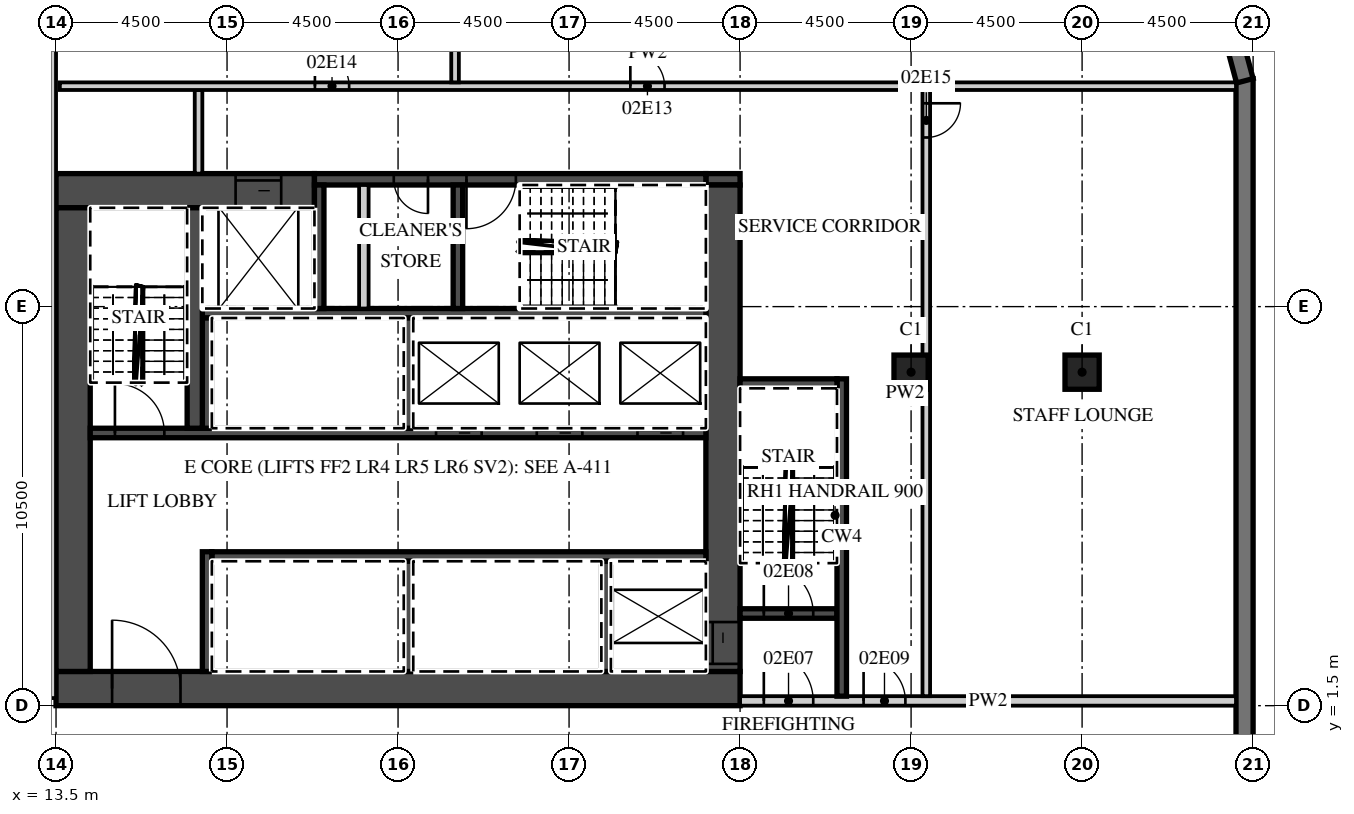
"""IFC4 building model, lengths in metres.
Left out: names, types, materials, properties, quantities, classifications, styles, units other than length and angle.
Written with IfcOpenShell. Run it as: python <this file> out.ifc"""

import sys

from ifc_helpers import new_model, si_unit, direction, frame, frame_2d, origin, origin_2d, place, context, subcontext, project, spatial, polyline, rectangle, outline, extrude, element, fill, save


model = new_model("IFC4")
c1 = context("Model", 3, precision=1e-05, world=origin(), true_north=direction((0.0, 1.0)))
c2 = subcontext(c1, "Body", "Model", "MODEL_VIEW")
j1 = project(units=[si_unit("LENGTHUNIT", "METRE"), si_unit("PLANEANGLEUNIT", "RADIAN")], contexts=[c1])
p1 = place(None, origin())
s1 = spatial("IfcSite", under=j1, at=p1, CompositionType="ELEMENT")
p2 = place(p1, origin())
s2 = spatial("IfcBuilding", under=s1, at=p2, CompositionType="ELEMENT")
p3 = place(p2, frame((0.0, 0.0, 17.0)))
s3 = spatial("IfcBuildingStorey", under=s2, at=p3, CompositionType="ELEMENT", Elevation=17.0)
for number, where, z_axis, x_axis in (
    (1, (36.0, 10.275, 0.0), (0.0, 0.0, 1.0), (1.0, 0.0, 0.0)),
    (2, (40.5, 10.275, 0.0), (0.0, 0.0, 1.0), (1.0, 0.0, 0.0)),
):
    element("IfcColumn", number, at=place(p3, frame(where, z_axis=z_axis, x_axis=x_axis)), inside=s3, PredefinedType="COLUMN", context=c2, shape_type="SweptSolid", body=[
        extrude(rectangle(XDim=0.9, YDim=0.9, at=origin_2d()), origin(), (0.0, 0.0, 1.0), 6.5),
    ])
p4 = place(p3, frame((44.775, -18.0, 0.0), z_axis=(0.0, 0.0, 1.0), x_axis=(0.0, 1.0, 0.0)))
e3 = element("IfcWall", 3, at=p4, inside=s3, PredefinedType="SOLIDWALL", context=c2, shape_type="SweptSolid", body=[
    extrude(rectangle(XDim=36.0, YDim=0.45, at=frame_2d((18.0, 0.0))), origin(), (0.0, 0.0, 1.0), 6.05),
])
p5 = place(p4, frame((4.05, 0.0, 0.9)))
e4 = element("IfcOpeningElement", 4, at=p5, cuts=e3, PredefinedType="OPENING", context=c2, shape_type="SweptSolid", body=[
    extrude(rectangle(XDim=3.0, YDim=1.8, at=frame_2d((1.5, 0.9))), frame((0.0, 0.235, 0.0), z_axis=(0.0, -1.0, 0.0), x_axis=(1.0, 0.0, 0.0)), (0.0, 0.0, 1.0), 0.47),
])
p6 = place(p3, frame((44.783, 17.942, 0.0), z_axis=(0.0, 0.0, 1.0), x_axis=(-0.25881466832, 0.965926999034, 0.0)))
e5 = element("IfcWall", 5, at=p6, inside=s3, PredefinedType="SOLIDWALL", context=c2, shape_type="SweptSolid", body=[
    extrude(outline(polyline([(0.0, -0.225), (2.071, -0.225), (1.95, 0.225), (0.121, 0.225), (0.0, -0.225)])), origin(), (0.0, 0.0, 1.0), 6.05),
])
p7 = place(p3, frame((13.5, 1.95, 0.0), z_axis=(0.0, 0.0, 1.0), x_axis=(1.0, 0.0, 0.0)))
e6 = element("IfcWall", 6, at=p7, inside=s3, PredefinedType="SHEAR", context=c2, shape_type="SweptSolid", body=[
    extrude(rectangle(XDim=18.0, YDim=0.9, at=frame_2d((9.0, 0.0))), origin(), (0.0, 0.0, 1.0), 6.05),
])
p8 = place(p7, frame((1.475, 0.0, 0.0)))
e7 = element("IfcOpeningElement", 7, at=p8, cuts=e6, PredefinedType="OPENING", context=c2, shape_type="SweptSolid", body=[
    extrude(rectangle(XDim=1.8, YDim=2.1, at=frame_2d((0.9, 1.05))), frame((0.0, 0.46, 0.0), z_axis=(0.0, -1.0, 0.0), x_axis=(1.0, 0.0, 0.0)), (0.0, 0.0, 1.0), 0.92),
])
p9 = place(p3, frame((13.5, 15.05, 0.0), z_axis=(0.0, 0.0, 1.0), x_axis=(1.0, 0.0, 0.0)))
e8 = element("IfcWall", 8, at=p9, inside=s3, PredefinedType="SHEAR", context=c2, shape_type="SweptSolid", body=[
    extrude(rectangle(XDim=6.8, YDim=0.9, at=frame_2d((3.4, 0.0))), origin(), (0.0, 0.0, 1.0), 6.05),
])
p10 = place(p9, frame((4.725, 0.0, 0.0)))
e9 = element("IfcOpeningElement", 9, at=p10, cuts=e8, PredefinedType="OPENING", context=c2, shape_type="SweptSolid", body=[
    extrude(rectangle(XDim=1.2, YDim=2.1, at=frame_2d((0.6, 1.05))), frame((0.0, 0.46, 0.0), z_axis=(0.0, -1.0, 0.0), x_axis=(1.0, 0.0, 0.0)), (0.0, 0.0, 1.0), 0.92),
])
p11 = place(p3, frame((30.6, 15.35, 0.0), z_axis=(0.0, 0.0, 1.0), x_axis=(1.0, 0.0, 0.0)))
e10 = element("IfcWall", 10, at=p11, inside=s3, PredefinedType="SHEAR", context=c2, shape_type="SweptSolid", body=[
    extrude(rectangle(XDim=0.9, YDim=0.3, at=frame_2d((0.45, 0.0))), origin(), (0.0, 0.0, 1.0), 6.05),
])
p12 = place(p3, frame((20.3, 15.35, 0.0), z_axis=(0.0, 0.0, 1.0), x_axis=(1.0, 0.0, 0.0)))
e11 = element("IfcWall", 11, at=p12, inside=s3, PredefinedType="SHEAR", context=c2, shape_type="SweptSolid", body=[
    extrude(rectangle(XDim=10.3, YDim=0.3, at=frame_2d((5.15, 0.0))), origin(), (0.0, 0.0, 1.0), 6.05),
])
p13 = place(p12, frame((4.0, 0.0, 0.0)))
e12 = element("IfcOpeningElement", 12, at=p13, cuts=e11, PredefinedType="OPENING", context=c2, shape_type="SweptSolid", body=[
    extrude(rectangle(XDim=1.3, YDim=2.1, at=frame_2d((0.65, 1.05))), frame((0.0, 0.16, 0.0), z_axis=(0.0, -1.0, 0.0), x_axis=(1.0, 0.0, 0.0)), (0.0, 0.0, 1.0), 0.32),
])
p14 = place(p12, frame((2.087, 0.0, 0.0)))
e13 = element("IfcOpeningElement", 13, at=p14, cuts=e11, PredefinedType="OPENING", context=c2, shape_type="SweptSolid", body=[
    extrude(rectangle(XDim=0.9, YDim=2.1, at=frame_2d((0.45, 1.05))), frame((0.0, 0.16, 0.0), z_axis=(0.0, -1.0, 0.0), x_axis=(1.0, 0.0, 0.0)), (0.0, 0.0, 1.0), 0.32),
])
p15 = place(p3, frame((31.05, 2.4, 0.0), z_axis=(0.0, 0.0, 1.0), x_axis=(0.0, 1.0, 0.0)))
e14 = element("IfcWall", 14, at=p15, inside=s3, PredefinedType="SHEAR", context=c2, shape_type="SweptSolid", body=[
    extrude(rectangle(XDim=12.8, YDim=0.9, at=frame_2d((6.4, 0.0))), origin(), (0.0, 0.0, 1.0), 6.05),
])
p16 = place(p15, frame((0.2, 0.0, 0.0)))
e15 = element("IfcOpeningElement", 15, at=p16, cuts=e14, PredefinedType="OPENING", context=c2, shape_type="SweptSolid", body=[
    extrude(rectangle(XDim=1.1, YDim=2.1, at=frame_2d((0.55, 1.05))), frame((0.0, 0.46, 0.0), z_axis=(0.0, -1.0, 0.0), x_axis=(1.0, 0.0, 0.0)), (0.0, 0.0, 1.0), 0.92),
])
p17 = place(p3, frame((13.95, 2.4, 0.0), z_axis=(0.0, 0.0, 1.0), x_axis=(0.0, 1.0, 0.0)))
e16 = element("IfcWall", 16, at=p17, inside=s3, PredefinedType="SHEAR", context=c2, shape_type="SweptSolid", body=[
    extrude(rectangle(XDim=12.2, YDim=0.9, at=frame_2d((6.1, 0.0))), origin(), (0.0, 0.0, 1.0), 6.05),
])
p18 = place(p3, frame((17.6, 5.425, 0.0), z_axis=(0.0, 0.0, 1.0), x_axis=(1.0, 0.0, 0.0)))
e17 = element("IfcWall", 17, at=p18, inside=s3, PredefinedType="SHEAR", context=c2, shape_type="SweptSolid", body=[
    extrude(rectangle(XDim=13.0, YDim=0.25, at=frame_2d((6.5, 0.0))), origin(), (0.0, 0.0, 1.0), 6.05),
])
p19 = place(p3, frame((17.475, 2.4, 0.0), z_axis=(0.0, 0.0, 1.0), x_axis=(0.0, 1.0, 0.0)))
e18 = element("IfcWall", 18, at=p19, inside=s3, PredefinedType="SHEAR", context=c2, shape_type="SweptSolid", body=[
    extrude(rectangle(XDim=3.15, YDim=0.25, at=frame_2d((1.575, 0.0))), origin(), (0.0, 0.0, 1.0), 6.05),
])
for number, where, z_axis, x_axis in (
    (19, (27.975, 2.4, 0.0), (0.0, 0.0, 1.0), (0.0, 1.0, 0.0)),
    (20, (22.775, 2.4, 0.0), (0.0, 0.0, 1.0), (0.0, 1.0, 0.0)),
):
    element("IfcWall", number, at=place(p3, frame(where, z_axis=z_axis, x_axis=x_axis)), inside=s3, PredefinedType="SHEAR", context=c2, shape_type="SweptSolid", body=[
        extrude(rectangle(XDim=2.9, YDim=0.25, at=frame_2d((1.45, 0.0))), origin(), (0.0, 0.0, 1.0), 6.05),
    ])
p20 = place(p3, frame((14.4, 8.675, 0.0), z_axis=(0.0, 0.0, 1.0), x_axis=(1.0, 0.0, 0.0)))
e21 = element("IfcWall", 21, at=p20, inside=s3, PredefinedType="SHEAR", context=c2, shape_type="SweptSolid", body=[
    extrude(rectangle(XDim=16.2, YDim=0.25, at=frame_2d((8.1, 0.0))), origin(), (0.0, 0.0, 1.0), 6.05),
])
p21 = place(p20, frame((14.4, 0.0, 0.0)))
e22 = element("IfcOpeningElement", 22, at=p21, cuts=e21, PredefinedType="OPENING", context=c2, shape_type="SweptSolid", body=[
    extrude(rectangle(XDim=1.2, YDim=2.1, at=frame_2d((0.6, 1.05))), frame((0.0, 0.135, 0.0), z_axis=(0.0, -1.0, 0.0), x_axis=(1.0, 0.0, 0.0)), (0.0, 0.0, 1.0), 0.27),
])
p22 = place(p20, frame((11.75, 0.0, 0.0)))
e23 = element("IfcOpeningElement", 23, at=p22, cuts=e21, PredefinedType="OPENING", context=c2, shape_type="SweptSolid", body=[
    extrude(rectangle(XDim=1.2, YDim=2.1, at=frame_2d((0.6, 1.05))), frame((0.0, 0.135, 0.0), z_axis=(0.0, -1.0, 0.0), x_axis=(1.0, 0.0, 0.0)), (0.0, 0.0, 1.0), 0.27),
])
p23 = place(p20, frame((9.1, 0.0, 0.0)))
e24 = element("IfcOpeningElement", 24, at=p23, cuts=e21, PredefinedType="OPENING", context=c2, shape_type="SweptSolid", body=[
    extrude(rectangle(XDim=1.2, YDim=2.1, at=frame_2d((0.6, 1.05))), frame((0.0, 0.135, 0.0), z_axis=(0.0, -1.0, 0.0), x_axis=(1.0, 0.0, 0.0)), (0.0, 0.0, 1.0), 0.27),
])
p24 = place(p20, frame((0.65, 0.0, 0.0)))
e25 = element("IfcOpeningElement", 25, at=p24, cuts=e21, PredefinedType="OPENING", context=c2, shape_type="SweptSolid", body=[
    extrude(rectangle(XDim=1.3, YDim=2.1, at=frame_2d((0.65, 1.05))), frame((0.0, 0.135, 0.0), z_axis=(0.0, -1.0, 0.0), x_axis=(1.0, 0.0, 0.0)), (0.0, 0.0, 1.0), 0.27),
])
p25 = place(p3, frame((17.35, 11.825, 0.0), z_axis=(0.0, 0.0, 1.0), x_axis=(1.0, 0.0, 0.0)))
e26 = element("IfcWall", 26, at=p25, inside=s3, PredefinedType="SHEAR", context=c2, shape_type="SweptSolid", body=[
    extrude(rectangle(XDim=13.25, YDim=0.25, at=frame_2d((6.625, 0.0))), origin(), (0.0, 0.0, 1.0), 6.05),
])
for number, where, z_axis, x_axis in (
    (27, (17.475, 8.8, 0.0), (0.0, 0.0, 1.0), (0.0, 1.0, 0.0)),
    (28, (22.775, 8.8, 0.0), (0.0, 0.0, 1.0), (0.0, 1.0, 0.0)),
):
    element("IfcWall", number, at=place(p3, frame(where, z_axis=z_axis, x_axis=x_axis)), inside=s3, PredefinedType="SHEAR", context=c2, shape_type="SweptSolid", body=[
        extrude(rectangle(XDim=2.9, YDim=0.25, at=frame_2d((1.45, 0.0))), origin(), (0.0, 0.0, 1.0), 6.05),
    ])
p26 = place(p3, frame((17.15, 8.8, 0.0), z_axis=(0.0, 0.0, 1.0), x_axis=(0.0, 1.0, 0.0)))
e29 = element("IfcWall", 29, at=p26, inside=s3, PredefinedType="SHEAR", context=c2, shape_type="SweptSolid", body=[
    extrude(rectangle(XDim=5.8, YDim=0.4, at=frame_2d((2.9, 0.0))), origin(), (0.0, 0.0, 1.0), 6.05),
])
for number, where, z_axis, x_axis in (
    (30, (20.425, 11.95, 0.0), (0.0, 0.0, 1.0), (0.0, 1.0, 0.0)),
    (31, (24.075, 11.95, 0.0), (0.0, 0.0, 1.0), (0.0, 1.0, 0.0)),
):
    element("IfcWall", number, at=place(p3, frame(where, z_axis=z_axis, x_axis=x_axis)), inside=s3, PredefinedType="SHEAR", context=c2, shape_type="SweptSolid", body=[
        extrude(rectangle(XDim=3.25, YDim=0.25, at=frame_2d((1.625, 0.0))), origin(), (0.0, 0.0, 1.0), 6.05),
    ])
p27 = place(p3, frame((21.6, 11.95, 0.0), z_axis=(0.0, 0.0, 1.0), x_axis=(0.0, 1.0, 0.0)))
e32 = element("IfcWall", 32, at=p27, inside=s3, PredefinedType="PARTITIONING", context=c2, shape_type="SweptSolid", body=[
    extrude(rectangle(XDim=3.25, YDim=0.25, at=frame_2d((1.625, 0.0))), origin(), (0.0, 0.0, 1.0), 6.05),
])
p28 = place(p3, frame((31.5, 1.625, 0.0), z_axis=(0.0, 0.0, 1.0), x_axis=(1.0, 0.0, 0.0)))
e33 = element("IfcWall", 33, at=p28, inside=s3, PredefinedType="PARTITIONING", context=c2, shape_type="SweptSolid", body=[
    extrude(rectangle(XDim=13.05, YDim=0.25, at=frame_2d((6.525, 0.0))), origin(), (0.0, 0.0, 1.0), 6.05),
])
p29 = place(p28, frame((0.625, 0.0, 0.0)))
e34 = element("IfcOpeningElement", 34, at=p29, cuts=e33, PredefinedType="OPENING", context=c2, shape_type="SweptSolid", body=[
    extrude(rectangle(XDim=1.3, YDim=2.1, at=frame_2d((0.65, 1.05))), frame((0.0, 0.135, 0.0), z_axis=(0.0, -1.0, 0.0), x_axis=(1.0, 0.0, 0.0)), (0.0, 0.0, 1.0), 0.27),
])
p30 = place(p28, frame((3.25, 0.0, 0.0)))
e35 = element("IfcOpeningElement", 35, at=p30, cuts=e33, PredefinedType="OPENING", context=c2, shape_type="SweptSolid", body=[
    extrude(rectangle(XDim=1.1, YDim=2.1, at=frame_2d((0.55, 1.05))), frame((0.0, 0.135, 0.0), z_axis=(0.0, -1.0, 0.0), x_axis=(1.0, 0.0, 0.0)), (0.0, 0.0, 1.0), 0.27),
])
p31 = place(p3, frame((31.5, 3.925, 0.0), z_axis=(0.0, 0.0, 1.0), x_axis=(1.0, 0.0, 0.0)))
e36 = element("IfcWall", 36, at=p31, inside=s3, PredefinedType="SHEAR", context=c2, shape_type="SweptSolid", body=[
    extrude(rectangle(XDim=2.55, YDim=0.25, at=frame_2d((1.275, 0.0))), origin(), (0.0, 0.0, 1.0), 6.05),
])
p32 = place(p31, frame((0.625, 0.0, 0.0)))
e37 = element("IfcOpeningElement", 37, at=p32, cuts=e36, PredefinedType="OPENING", context=c2, shape_type="SweptSolid", body=[
    extrude(rectangle(XDim=1.3, YDim=2.1, at=frame_2d((0.65, 1.05))), frame((0.0, 0.135, 0.0), z_axis=(0.0, -1.0, 0.0), x_axis=(1.0, 0.0, 0.0)), (0.0, 0.0, 1.0), 0.27),
])
p33 = place(p3, frame((34.175, 1.75, 0.0), z_axis=(0.0, 0.0, 1.0), x_axis=(0.0, 1.0, 0.0)))
e38 = element("IfcWall", 38, at=p33, inside=s3, PredefinedType="SHEAR", context=c2, shape_type="SweptSolid", body=[
    extrude(rectangle(XDim=8.35, YDim=0.25, at=frame_2d((4.175, 0.0))), origin(), (0.0, 0.0, 1.0), 6.05),
])
p34 = place(p3, frame((31.5, 9.975, 0.0), z_axis=(0.0, 0.0, 1.0), x_axis=(1.0, 0.0, 0.0)))
e39 = element("IfcWall", 39, at=p34, inside=s3, PredefinedType="SHEAR", context=c2, shape_type="SweptSolid", body=[
    extrude(rectangle(XDim=2.55, YDim=0.25, at=frame_2d((1.275, 0.0))), origin(), (0.0, 0.0, 1.0), 6.05),
])
p35 = place(p3, frame((17.25, 15.5, 0.0), z_axis=(0.0, 0.0, 1.0), x_axis=(0.0, 1.0, 0.0)))
e40 = element("IfcWall", 40, at=p35, inside=s3, PredefinedType="PARTITIONING", context=c2, shape_type="SweptSolid", body=[
    extrude(rectangle(XDim=2.2, YDim=0.2, at=frame_2d((1.1, 0.0))), origin(), (0.0, 0.0, 1.0), 6.05),
])
p36 = place(p3, frame((36.4, 1.75, 0.0), z_axis=(0.0, 0.0, 1.0), x_axis=(0.0, 1.0, 0.0)))
e41 = element("IfcWall", 41, at=p36, inside=s3, PredefinedType="PARTITIONING", context=c2, shape_type="SweptSolid", body=[
    extrude(rectangle(XDim=15.95, YDim=0.2, at=frame_2d((7.975, 0.0))), origin(), (0.0, 0.0, 1.0), 6.05),
])
p37 = place(p36, frame((14.7, 0.0, 0.0)))
e42 = element("IfcOpeningElement", 42, at=p37, cuts=e41, PredefinedType="OPENING", context=c2, shape_type="SweptSolid", body=[
    extrude(rectangle(XDim=0.9, YDim=2.1, at=frame_2d((0.45, 1.05))), frame((0.0, 0.11, 0.0), z_axis=(0.0, -1.0, 0.0), x_axis=(1.0, 0.0, 0.0)), (0.0, 0.0, 1.0), 0.22),
])
p38 = place(p3, frame((13.6, 17.8, 0.0), z_axis=(0.0, 0.0, 1.0), x_axis=(1.0, 0.0, 0.0)))
e43 = element("IfcWall", 43, at=p38, inside=s3, PredefinedType="PARTITIONING", context=c2, shape_type="SweptSolid", body=[
    extrude(rectangle(XDim=30.95, YDim=0.2, at=frame_2d((15.475, 0.0))), origin(), (0.0, 0.0, 1.0), 6.05),
])
p39 = place(p38, frame((15.012, 0.0, 0.0)))
e44 = element("IfcOpeningElement", 44, at=p39, cuts=e43, PredefinedType="OPENING", context=c2, shape_type="SweptSolid", body=[
    extrude(rectangle(XDim=0.9, YDim=2.1, at=frame_2d((0.45, 1.05))), frame((0.0, 0.11, 0.0), z_axis=(0.0, -1.0, 0.0), x_axis=(1.0, 0.0, 0.0)), (0.0, 0.0, 1.0), 0.22),
])
p40 = place(p38, frame((6.712, 0.0, 0.0)))
e45 = element("IfcOpeningElement", 45, at=p40, cuts=e43, PredefinedType="OPENING", context=c2, shape_type="SweptSolid", body=[
    extrude(rectangle(XDim=0.9, YDim=2.1, at=frame_2d((0.45, 1.05))), frame((0.0, 0.11, 0.0), z_axis=(0.0, -1.0, 0.0), x_axis=(1.0, 0.0, 0.0)), (0.0, 0.0, 1.0), 0.22),
])
p41 = place(p3, frame((24.0, 17.9, 0.0), z_axis=(0.0, 0.0, 1.0), x_axis=(0.0, 1.0, 0.0)))
e46 = element("IfcWall", 46, at=p41, inside=s3, PredefinedType="PARTITIONING", context=c2, shape_type="SweptSolid", body=[
    extrude(rectangle(XDim=3.65, YDim=0.2, at=frame_2d((1.825, 0.0))), origin(), (0.0, 0.0, 1.0), 6.05),
])
p42 = place(p3, frame((13.4, 1.7, 0.0), z_axis=(0.0, 0.0, 1.0), x_axis=(0.0, 1.0, 0.0)))
e47 = element("IfcWall", 47, at=p42, inside=s3, PredefinedType="PARTITIONING", context=c2, shape_type="SweptSolid", body=[
    extrude(rectangle(XDim=20.15, YDim=0.2, at=frame_2d((10.075, 0.0))), origin(), (0.0, 0.0, 1.0), 6.05),
])
p43 = place(p21, origin())
e48 = element("IfcDoor", 48, at=p43, inside=s3, OperationType="SLIDING_TO_LEFT", PredefinedType="DOOR", context=c2, shape_type="SweptSolid", body=[
    extrude(rectangle(XDim=1.2, YDim=2.1, at=frame_2d((0.6, 1.05))), frame((0.0, 0.025, 0.0), z_axis=(0.0, -1.0, 0.0), x_axis=(1.0, 0.0, 0.0)), (0.0, 0.0, 1.0), 0.05),
])
fill(e22, e48)
p44 = place(p22, origin())
e49 = element("IfcDoor", 49, at=p44, inside=s3, OperationType="SLIDING_TO_RIGHT", PredefinedType="DOOR", context=c2, shape_type="SweptSolid", body=[
    extrude(rectangle(XDim=1.2, YDim=2.1, at=frame_2d((0.6, 1.05))), frame((0.0, 0.025, 0.0), z_axis=(0.0, -1.0, 0.0), x_axis=(1.0, 0.0, 0.0)), (0.0, 0.0, 1.0), 0.05),
])
fill(e23, e49)
p45 = place(p23, origin())
e50 = element("IfcDoor", 50, at=p45, inside=s3, OperationType="SLIDING_TO_RIGHT", PredefinedType="DOOR", context=c2, shape_type="SweptSolid", body=[
    extrude(rectangle(XDim=1.2, YDim=2.1, at=frame_2d((0.6, 1.05))), frame((0.0, 0.025, 0.0), z_axis=(0.0, -1.0, 0.0), x_axis=(1.0, 0.0, 0.0)), (0.0, 0.0, 1.0), 0.05),
])
fill(e24, e50)
p46 = place(p10, origin())
e51 = element("IfcDoor", 51, at=p46, inside=s3, OperationType="SLIDING_TO_LEFT", PredefinedType="DOOR", context=c2, shape_type="SweptSolid", body=[
    extrude(rectangle(XDim=1.2, YDim=2.1, at=frame_2d((0.6, 1.05))), frame((0.0, 0.025, 0.0), z_axis=(0.0, -1.0, 0.0), x_axis=(1.0, 0.0, 0.0)), (0.0, 0.0, 1.0), 0.05),
])
fill(e9, e51)
p47 = place(p16, origin())
e52 = element("IfcDoor", 52, at=p47, inside=s3, OperationType="SLIDING_TO_LEFT", PredefinedType="DOOR", context=c2, shape_type="SweptSolid", body=[
    extrude(rectangle(XDim=1.1, YDim=2.1, at=frame_2d((0.55, 1.05))), frame((0.0, 0.025, 0.0), z_axis=(0.0, -1.0, 0.0), x_axis=(1.0, 0.0, 0.0)), (0.0, 0.0, 1.0), 0.05),
])
fill(e15, e52)
p48 = place(p8, origin())
e53 = element("IfcDoor", 53, at=p48, inside=s3, OperationType="DOUBLE_DOOR_DOUBLE_SWING", PredefinedType="DOOR", context=c2, shape_type="SweptSolid", body=[
    extrude(rectangle(XDim=1.8, YDim=2.1, at=frame_2d((0.9, 1.05))), frame((0.0, 0.025, 0.0), z_axis=(0.0, -1.0, 0.0), x_axis=(1.0, 0.0, 0.0)), (0.0, 0.0, 1.0), 0.05),
])
fill(e7, e53)
p49 = place(p29, origin())
e54 = element("IfcDoor", 54, at=p49, inside=s3, OperationType="SINGLE_SWING_LEFT", PredefinedType="DOOR", context=c2, shape_type="SweptSolid", body=[
    extrude(rectangle(XDim=1.3, YDim=2.1, at=frame_2d((0.65, 1.05))), frame((0.0, 0.025, 0.0), z_axis=(0.0, -1.0, 0.0), x_axis=(1.0, 0.0, 0.0)), (0.0, 0.0, 1.0), 0.05),
])
fill(e34, e54)
p50 = place(p32, origin())
e55 = element("IfcDoor", 55, at=p50, inside=s3, OperationType="SINGLE_SWING_LEFT", PredefinedType="DOOR", context=c2, shape_type="SweptSolid", body=[
    extrude(rectangle(XDim=1.3, YDim=2.1, at=frame_2d((0.65, 1.05))), frame((0.0, 0.025, 0.0), z_axis=(0.0, -1.0, 0.0), x_axis=(1.0, 0.0, 0.0)), (0.0, 0.0, 1.0), 0.05),
])
fill(e37, e55)
p51 = place(p30, origin())
e56 = element("IfcDoor", 56, at=p51, inside=s3, OperationType="SINGLE_SWING_LEFT", PredefinedType="DOOR", context=c2, shape_type="SweptSolid", body=[
    extrude(rectangle(XDim=1.1, YDim=2.1, at=frame_2d((0.55, 1.05))), frame((0.0, 0.025, 0.0), z_axis=(0.0, -1.0, 0.0), x_axis=(1.0, 0.0, 0.0)), (0.0, 0.0, 1.0), 0.05),
])
fill(e35, e56)
p52 = place(p24, origin())
e57 = element("IfcDoor", 57, at=p52, inside=s3, OperationType="SINGLE_SWING_LEFT", PredefinedType="DOOR", context=c2, shape_type="SweptSolid", body=[
    extrude(rectangle(XDim=1.3, YDim=2.1, at=frame_2d((0.65, 1.05))), frame((0.0, 0.025, 0.0), z_axis=(0.0, -1.0, 0.0), x_axis=(1.0, 0.0, 0.0)), (0.0, 0.0, 1.0), 0.05),
])
fill(e25, e57)
p53 = place(p13, origin())
e58 = element("IfcDoor", 58, at=p53, inside=s3, OperationType="SINGLE_SWING_LEFT", PredefinedType="DOOR", context=c2, shape_type="SweptSolid", body=[
    extrude(rectangle(XDim=1.3, YDim=2.1, at=frame_2d((0.65, 1.05))), frame((0.0, 0.025, 0.0), z_axis=(0.0, -1.0, 0.0), x_axis=(1.0, 0.0, 0.0)), (0.0, 0.0, 1.0), 0.05),
])
fill(e12, e58)
p54 = place(p14, origin())
e59 = element("IfcDoor", 59, at=p54, inside=s3, OperationType="SINGLE_SWING_RIGHT", PredefinedType="DOOR", context=c2, shape_type="SweptSolid", body=[
    extrude(rectangle(XDim=0.9, YDim=2.1, at=frame_2d((0.45, 1.05))), frame((0.0, 0.025, 0.0), z_axis=(0.0, -1.0, 0.0), x_axis=(1.0, 0.0, 0.0)), (0.0, 0.0, 1.0), 0.05),
])
fill(e13, e59)
p55 = place(p39, origin())
e60 = element("IfcDoor", 60, at=p55, inside=s3, OperationType="SINGLE_SWING_LEFT", PredefinedType="DOOR", context=c2, shape_type="SweptSolid", body=[
    extrude(rectangle(XDim=0.9, YDim=2.1, at=frame_2d((0.45, 1.05))), frame((0.0, 0.025, 0.0), z_axis=(0.0, -1.0, 0.0), x_axis=(1.0, 0.0, 0.0)), (0.0, 0.0, 1.0), 0.05),
])
fill(e44, e60)
p56 = place(p40, origin())
e61 = element("IfcDoor", 61, at=p56, inside=s3, OperationType="SINGLE_SWING_LEFT", PredefinedType="DOOR", context=c2, shape_type="SweptSolid", body=[
    extrude(rectangle(XDim=0.9, YDim=2.1, at=frame_2d((0.45, 1.05))), frame((0.0, 0.025, 0.0), z_axis=(0.0, -1.0, 0.0), x_axis=(1.0, 0.0, 0.0)), (0.0, 0.0, 1.0), 0.05),
])
fill(e45, e61)
p57 = place(p37, origin())
e62 = element("IfcDoor", 62, at=p57, inside=s3, OperationType="SINGLE_SWING_RIGHT", PredefinedType="DOOR", context=c2, shape_type="SweptSolid", body=[
    extrude(rectangle(XDim=0.9, YDim=2.1, at=frame_2d((0.45, 1.05))), frame((0.0, 0.025, 0.0), z_axis=(0.0, -1.0, 0.0), x_axis=(1.0, 0.0, 0.0)), (0.0, 0.0, 1.0), 0.05),
])
fill(e42, e62)
save(model, sys.argv[1])
